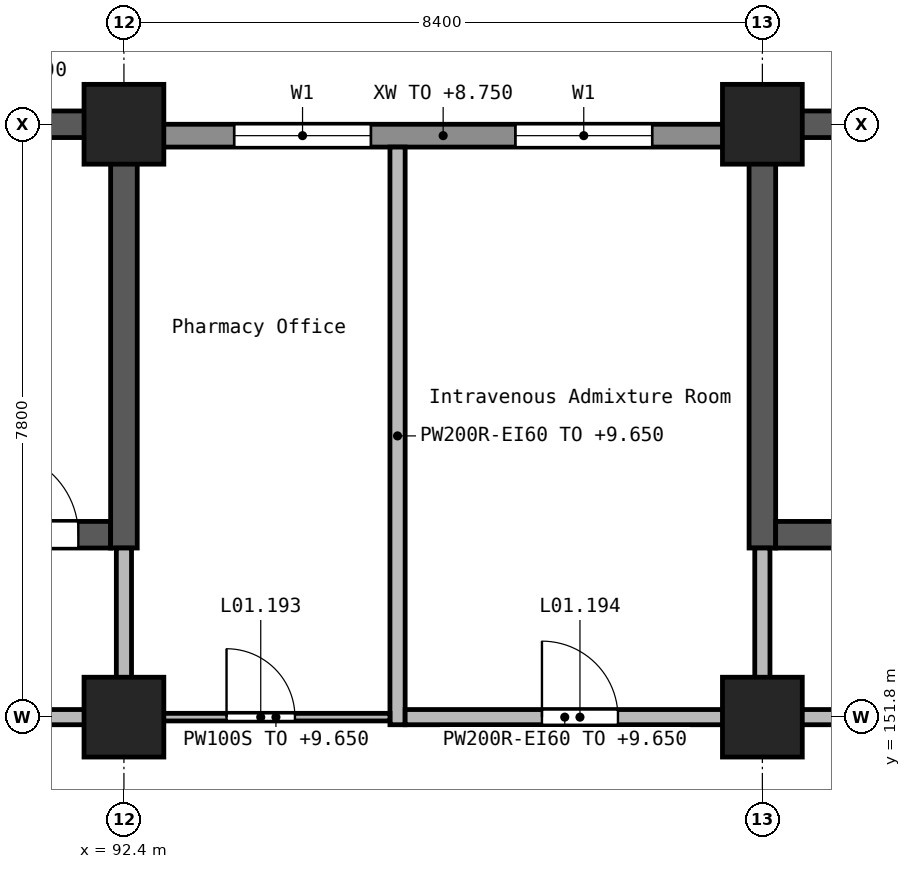
"""IFC4 building model, lengths in metres.
Left out: names, types, materials, properties, quantities, classifications, styles, units other than length and angle.
Written with IfcOpenShell. Run it as: python <this file> out.ifc"""

import sys

from ifc_helpers import new_model, si_unit, direction, frame, frame_2d, origin, origin_2d, place, context, subcontext, project, spatial, rectangle, extrude, element, fill, save


model = new_model("IFC4")
c1 = context("Model", 3, precision=1e-05, world=origin(), true_north=direction((0.0, 1.0)))
c2 = subcontext(c1, "Body", "Model", "MODEL_VIEW")
j1 = project(units=[si_unit("LENGTHUNIT", "METRE"), si_unit("PLANEANGLEUNIT", "RADIAN")], contexts=[c1])
p1 = place(None, origin())
s1 = spatial("IfcSite", under=j1, at=p1, CompositionType="ELEMENT")
p2 = place(p1, origin())
s2 = spatial("IfcBuilding", under=s1, at=p2, CompositionType="ELEMENT")
p3 = place(p2, frame((0.0, 0.0, 5.4)))
s3 = spatial("IfcBuildingStorey", under=s2, at=p3, CompositionType="ELEMENT", Elevation=5.4)
for number, where, z_axis, x_axis in (
    (1, (92.4, 151.8, 0.0), (0.0, 0.0, 1.0), (1.0, 0.0, 0.0)),
    (2, (92.4, 159.6, 0.0), (0.0, 0.0, 1.0), (1.0, 0.0, 0.0)),
    (3, (100.8, 151.8, 0.0), (0.0, 0.0, 1.0), (1.0, 0.0, 0.0)),
    (4, (100.8, 159.6, 0.0), (0.0, 0.0, 1.0), (1.0, 0.0, 0.0)),
):
    element("IfcColumn", number, at=place(p3, frame(where, z_axis=z_axis, x_axis=x_axis)), inside=s3, PredefinedType="COLUMN", context=c2, shape_type="SweptSolid", body=[
        extrude(rectangle(XDim=1.05, YDim=1.05, at=origin_2d()), origin(), (0.0, 0.0, 1.0), 4.5),
    ])
p4 = place(p3, frame((83.825, 159.6, 0.0), z_axis=(0.0, 0.0, 1.0), x_axis=(1.0, 0.0, 0.0)))
e5 = element("IfcWall", 5, at=p4, inside=s3, PredefinedType="SHEAR", context=c2, shape_type="SweptSolid", body=[
    extrude(rectangle(XDim=8.4, YDim=0.35, at=frame_2d((4.2, 0.0))), origin(), (0.0, 0.0, 1.0), 4.5),
])
p5 = place(p3, frame((84.175, 154.2, 0.0), z_axis=(0.0, 0.0, 1.0), x_axis=(1.0, 0.0, 0.0)))
e6 = element("IfcWall", 6, at=p5, inside=s3, PredefinedType="SHEAR", context=c2, shape_type="SweptSolid", body=[
    extrude(rectangle(XDim=8.05, YDim=0.35, at=frame_2d((4.025, 0.0))), origin(), (0.0, 0.0, 1.0), 4.5),
])
p6 = place(p5, frame((6.525, 0.0, 0.0)))
e7 = element("IfcOpeningElement", 7, at=p6, cuts=e6, PredefinedType="OPENING", context=c2, shape_type="SweptSolid", body=[
    extrude(rectangle(XDim=1.1, YDim=2.1, at=frame_2d((0.55, 1.05))), frame((0.0, 0.185, 0.0), z_axis=(0.0, -1.0, 0.0), x_axis=(1.0, 0.0, 0.0)), (0.0, 0.0, 1.0), 0.37),
])
p7 = place(p3, frame((92.4, 154.025, 0.0), z_axis=(0.0, 0.0, 1.0), x_axis=(0.0, 1.0, 0.0)))
e8 = element("IfcWall", 8, at=p7, inside=s3, PredefinedType="SHEAR", context=c2, shape_type="SweptSolid", body=[
    extrude(rectangle(XDim=5.75, YDim=0.35, at=frame_2d((2.875, 0.0))), origin(), (0.0, 0.0, 1.0), 4.5),
])
p8 = place(p3, frame((100.625, 159.6, 0.0), z_axis=(0.0, 0.0, 1.0), x_axis=(1.0, 0.0, 0.0)))
e9 = element("IfcWall", 9, at=p8, inside=s3, PredefinedType="SHEAR", context=c2, shape_type="SweptSolid", body=[
    extrude(rectangle(XDim=8.4, YDim=0.35, at=frame_2d((4.2, 0.0))), origin(), (0.0, 0.0, 1.0), 4.5),
])
p9 = place(p3, frame((100.8, 154.025, 0.0), z_axis=(0.0, 0.0, 1.0), x_axis=(0.0, 1.0, 0.0)))
e10 = element("IfcWall", 10, at=p9, inside=s3, PredefinedType="SHEAR", context=c2, shape_type="SweptSolid", body=[
    extrude(rectangle(XDim=5.4, YDim=0.35, at=frame_2d((2.7, 0.0))), origin(), (0.0, 0.0, 1.0), 4.5),
])
p10 = place(p3, frame((100.975, 154.2, 0.0), z_axis=(0.0, 0.0, 1.0), x_axis=(1.0, 0.0, 0.0)))
e11 = element("IfcWall", 11, at=p10, inside=s3, PredefinedType="SHEAR", context=c2, shape_type="SweptSolid", body=[
    extrude(rectangle(XDim=8.05, YDim=0.35, at=frame_2d((4.025, 0.0))), origin(), (0.0, 0.0, 1.0), 4.5),
])
p11 = place(p10, frame((6.525, 0.0, 0.0)))
e12 = element("IfcOpeningElement", 12, at=p11, cuts=e11, PredefinedType="OPENING", context=c2, shape_type="SweptSolid", body=[
    extrude(rectangle(XDim=1.1, YDim=2.1, at=frame_2d((0.55, 1.05))), frame((0.0, 0.185, 0.0), z_axis=(0.0, -1.0, 0.0), x_axis=(1.0, 0.0, 0.0)), (0.0, 0.0, 1.0), 0.37),
])
p12 = place(p3, frame((100.3, 159.45, 0.0), z_axis=(0.0, 0.0, 1.0), x_axis=(-1.0, 0.0, 0.0)))
e13 = element("IfcWall", 13, at=p12, inside=s3, PredefinedType="STANDARD", context=c2, shape_type="SweptSolid", body=[
    extrude(rectangle(XDim=7.4, YDim=0.3, at=frame_2d((3.7, 0.0))), origin(), (0.0, 0.0, 1.0), 3.35),
])
p13 = place(p12, frame((0.95, 0.0, 0.9)))
e14 = element("IfcOpeningElement", 14, at=p13, cuts=e13, PredefinedType="OPENING", context=c2, shape_type="SweptSolid", body=[
    extrude(rectangle(XDim=1.8, YDim=1.5, at=frame_2d((0.9, 0.75))), frame((0.0, 0.16, 0.0), z_axis=(0.0, -1.0, 0.0), x_axis=(1.0, 0.0, 0.0)), (0.0, 0.0, 1.0), 0.32),
])
p14 = place(p12, frame((4.65, 0.0, 0.9)))
e15 = element("IfcOpeningElement", 15, at=p14, cuts=e13, PredefinedType="OPENING", context=c2, shape_type="SweptSolid", body=[
    extrude(rectangle(XDim=1.8, YDim=1.5, at=frame_2d((0.9, 0.75))), frame((0.0, 0.16, 0.0), z_axis=(0.0, -1.0, 0.0), x_axis=(1.0, 0.0, 0.0)), (0.0, 0.0, 1.0), 0.32),
])
p15 = place(p3, frame((84.5, 151.8, 0.0), z_axis=(0.0, 0.0, 1.0), x_axis=(1.0, 0.0, 0.0)))
e16 = element("IfcWall", 16, at=p15, inside=s3, PredefinedType="SOLIDWALL", context=c2, shape_type="SweptSolid", body=[
    extrude(rectangle(XDim=7.4, YDim=0.2, at=frame_2d((3.7, 0.0))), origin(), (0.0, 0.0, 1.0), 4.25),
])
p16 = place(p15, frame((3.15, 0.0, 0.0)))
e17 = element("IfcOpeningElement", 17, at=p16, cuts=e16, PredefinedType="OPENING", context=c2, shape_type="SweptSolid", body=[
    extrude(rectangle(XDim=1.1, YDim=2.1, at=frame_2d((0.55, 1.05))), frame((0.0, 0.11, 0.0), z_axis=(0.0, -1.0, 0.0), x_axis=(1.0, 0.0, 0.0)), (0.0, 0.0, 1.0), 0.22),
])
p17 = place(p3, frame((101.3, 151.8, 0.0), z_axis=(0.0, 0.0, 1.0), x_axis=(1.0, 0.0, 0.0)))
e18 = element("IfcWall", 18, at=p17, inside=s3, PredefinedType="SOLIDWALL", context=c2, shape_type="SweptSolid", body=[
    extrude(rectangle(XDim=7.4, YDim=0.2, at=frame_2d((3.7, 0.0))), origin(), (0.0, 0.0, 1.0), 4.25),
])
p18 = place(p17, frame((3.15, 0.0, 0.0)))
e19 = element("IfcOpeningElement", 19, at=p18, cuts=e18, PredefinedType="OPENING", context=c2, shape_type="SweptSolid", body=[
    extrude(rectangle(XDim=1.1, YDim=2.1, at=frame_2d((0.55, 1.05))), frame((0.0, 0.11, 0.0), z_axis=(0.0, -1.0, 0.0), x_axis=(1.0, 0.0, 0.0)), (0.0, 0.0, 1.0), 0.22),
])
p19 = place(p3, frame((96.0, 151.7, 0.0), z_axis=(0.0, 0.0, 1.0), x_axis=(0.0, 1.0, 0.0)))
e20 = element("IfcWall", 20, at=p19, inside=s3, PredefinedType="SOLIDWALL", context=c2, shape_type="SweptSolid", body=[
    extrude(rectangle(XDim=7.6, YDim=0.2, at=frame_2d((3.8, 0.0))), origin(), (0.0, 0.0, 1.0), 4.25),
])
p20 = place(p3, frame((96.1, 151.8, 0.0), z_axis=(0.0, 0.0, 1.0), x_axis=(1.0, 0.0, 0.0)))
e21 = element("IfcWall", 21, at=p20, inside=s3, PredefinedType="SOLIDWALL", context=c2, shape_type="SweptSolid", body=[
    extrude(rectangle(XDim=4.2, YDim=0.2, at=frame_2d((2.1, 0.0))), origin(), (0.0, 0.0, 1.0), 4.25),
])
p21 = place(p20, frame((1.8, 0.0, 0.0)))
e22 = element("IfcOpeningElement", 22, at=p21, cuts=e21, PredefinedType="OPENING", context=c2, shape_type="SweptSolid", body=[
    extrude(rectangle(XDim=1.0, YDim=2.1, at=frame_2d((0.5, 1.05))), frame((0.0, 0.11, 0.0), z_axis=(0.0, -1.0, 0.0), x_axis=(1.0, 0.0, 0.0)), (0.0, 0.0, 1.0), 0.22),
])
for number, where, z_axis, x_axis in (
    (23, (92.4, 152.3, 0.0), (0.0, 0.0, 1.0), (0.0, 1.0, 0.0)),
    (24, (100.8, 152.3, 0.0), (0.0, 0.0, 1.0), (0.0, 1.0, 0.0)),
):
    element("IfcWall", number, at=place(p3, frame(where, z_axis=z_axis, x_axis=x_axis)), inside=s3, PredefinedType="SOLIDWALL", context=c2, shape_type="SweptSolid", body=[
        extrude(rectangle(XDim=1.725, YDim=0.2, at=frame_2d((0.862, 0.0))), origin(), (0.0, 0.0, 1.0), 4.25),
    ])
p22 = place(p3, frame((92.9, 151.8, 0.0), z_axis=(0.0, 0.0, 1.0), x_axis=(1.0, 0.0, 0.0)))
e25 = element("IfcWall", 25, at=p22, inside=s3, PredefinedType="PARTITIONING", context=c2, shape_type="SweptSolid", body=[
    extrude(rectangle(XDim=3.0, YDim=0.1, at=frame_2d((1.5, 0.0))), origin(), (0.0, 0.0, 1.0), 4.25),
])
p23 = place(p22, frame((0.85, 0.0, 0.0)))
e26 = element("IfcOpeningElement", 26, at=p23, cuts=e25, PredefinedType="OPENING", context=c2, shape_type="SweptSolid", body=[
    extrude(rectangle(XDim=0.9, YDim=2.1, at=frame_2d((0.45, 1.05))), frame((0.0, 0.06, 0.0), z_axis=(0.0, -1.0, 0.0), x_axis=(1.0, 0.0, 0.0)), (0.0, 0.0, 1.0), 0.12),
])
p24 = place(p13, origin())
e27 = element("IfcWindow", 27, at=p24, inside=s3, PartitioningType="SINGLE_PANEL", PredefinedType="WINDOW", context=c2, shape_type="SweptSolid", body=[
    extrude(rectangle(XDim=1.8, YDim=1.5, at=frame_2d((0.9, 0.75))), frame((0.0, 0.03, 0.0), z_axis=(0.0, -1.0, 0.0), x_axis=(1.0, 0.0, 0.0)), (0.0, 0.0, 1.0), 0.06),
])
fill(e14, e27)
p25 = place(p14, origin())
e28 = element("IfcWindow", 28, at=p25, inside=s3, PartitioningType="SINGLE_PANEL", PredefinedType="WINDOW", context=c2, shape_type="SweptSolid", body=[
    extrude(rectangle(XDim=1.8, YDim=1.5, at=frame_2d((0.9, 0.75))), frame((0.0, 0.03, 0.0), z_axis=(0.0, -1.0, 0.0), x_axis=(1.0, 0.0, 0.0)), (0.0, 0.0, 1.0), 0.06),
])
fill(e15, e28)
p26 = place(p6, origin())
e29 = element("IfcDoor", 29, at=p26, inside=s3, OperationType="SINGLE_SWING_RIGHT", PredefinedType="DOOR", context=c2, shape_type="SweptSolid", body=[
    extrude(rectangle(XDim=1.1, YDim=2.1, at=frame_2d((0.55, 1.05))), frame((0.0, 0.025, 0.0), z_axis=(0.0, -1.0, 0.0), x_axis=(1.0, 0.0, 0.0)), (0.0, 0.0, 1.0), 0.05),
])
fill(e7, e29)
p27 = place(p23, origin())
e30 = element("IfcDoor", 30, at=p27, inside=s3, OperationType="SINGLE_SWING_LEFT", PredefinedType="DOOR", context=c2, shape_type="SweptSolid", body=[
    extrude(rectangle(XDim=0.9, YDim=2.1, at=frame_2d((0.45, 1.05))), frame((0.0, 0.025, 0.0), z_axis=(0.0, -1.0, 0.0), x_axis=(1.0, 0.0, 0.0)), (0.0, 0.0, 1.0), 0.05),
])
fill(e26, e30)
p28 = place(p21, origin())
e31 = element("IfcDoor", 31, at=p28, inside=s3, OperationType="SINGLE_SWING_RIGHT", PredefinedType="DOOR", context=c2, shape_type="SweptSolid", body=[
    extrude(rectangle(XDim=1.0, YDim=2.1, at=frame_2d((0.5, 1.05))), frame((0.0, 0.025, 0.0), z_axis=(0.0, -1.0, 0.0), x_axis=(1.0, 0.0, 0.0)), (0.0, 0.0, 1.0), 0.05),
])
fill(e22, e31)
save(model, sys.argv[1])
